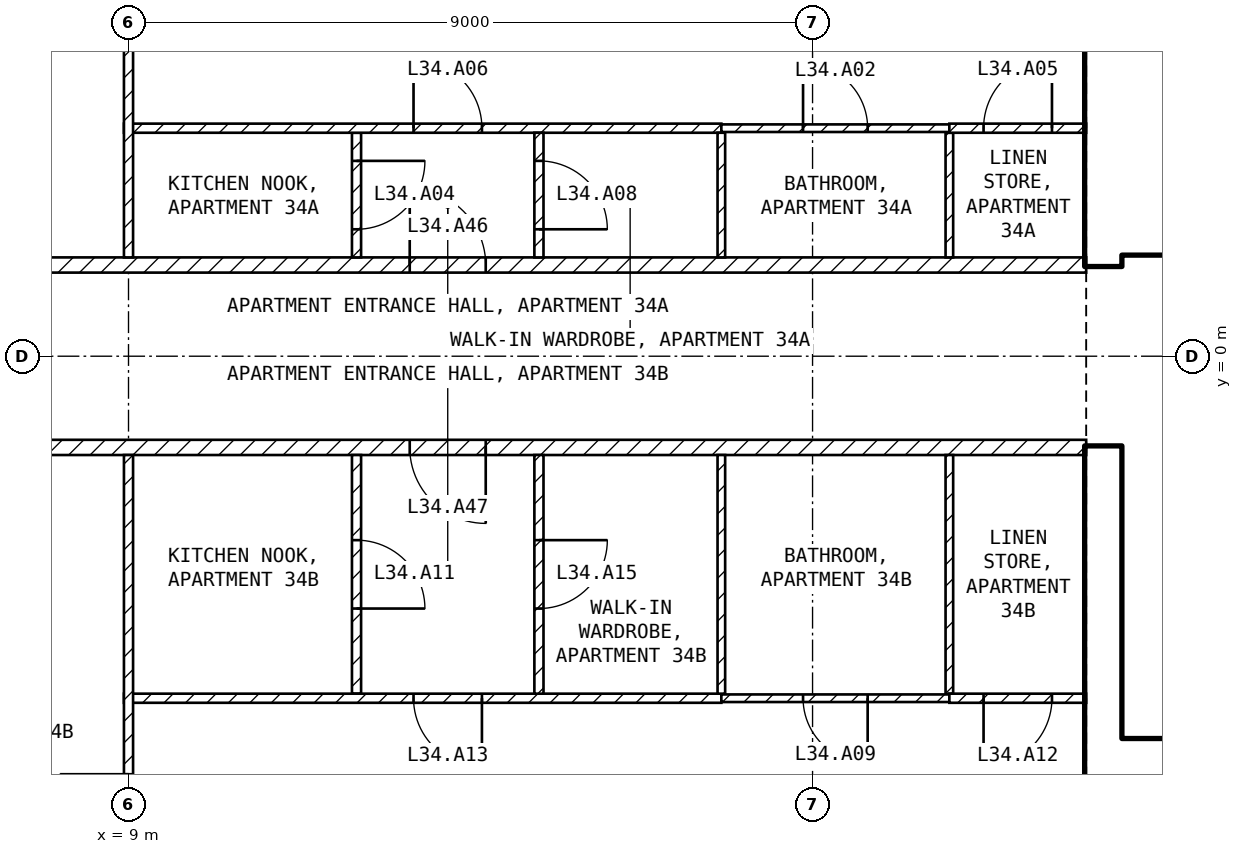
"""IFC4 building model, lengths in metres.
Left out: names, types, materials, properties, quantities, classifications, styles, units other than length and angle.
Written with IfcOpenShell. Run it as: python <this file> out.ifc"""

import sys

from ifc_helpers import new_model, si_unit, direction, frame, frame_2d, origin, place, context, subcontext, project, spatial, rectangle, extrude, element, fill, save


model = new_model("IFC4")
c1 = context("Model", 3, precision=1e-05, world=origin(), true_north=direction((0.0, 1.0)))
c2 = subcontext(c1, "Body", "Model", "MODEL_VIEW")
j1 = project(units=[si_unit("LENGTHUNIT", "METRE"), si_unit("PLANEANGLEUNIT", "RADIAN")], contexts=[c1])
p1 = place(None, origin())
s1 = spatial("IfcSite", under=j1, at=p1, CompositionType="ELEMENT")
p2 = place(p1, origin())
s2 = spatial("IfcBuilding", under=s1, at=p2, CompositionType="ELEMENT")
p3 = place(p2, frame((0.0, 0.0, 140.9)))
s3 = spatial("IfcBuildingStorey", under=s2, at=p3, CompositionType="ELEMENT", Elevation=140.9)
for number, where, z_axis, x_axis in (
    (1, (21.825, -8.1, 0.0), (0.0, 0.0, 1.0), (0.0, 1.0, 0.0)),
    (2, (21.825, 1.2, 0.0), (0.0, 0.0, 1.0), (0.0, 1.0, 0.0)),
):
    element("IfcWall", number, at=place(p3, frame(where, z_axis=z_axis, x_axis=x_axis)), inside=s3, PredefinedType="SHEAR", context=c2, shape_type="SweptSolid", body=[
        extrude(rectangle(XDim=6.9, YDim=0.45, at=frame_2d((3.45, 0.0))), origin(), (0.0, 0.0, 1.0), 3.25),
    ])
p4 = place(p3, frame((22.05, 1.45, 0.0), z_axis=(0.0, 0.0, 1.0), x_axis=(1.0, 0.0, 0.0)))
e3 = element("IfcWall", 3, at=p4, inside=s3, PredefinedType="SOLIDWALL", context=c2, shape_type="SweptSolid", body=[
    extrude(rectangle(XDim=11.0, YDim=0.2, at=frame_2d((5.5, 0.0))), origin(), (0.0, 0.0, 1.0), 3.25),
])
p5 = place(p4, frame((0.75, 0.0, 0.0)))
e4 = element("IfcOpeningElement", 4, at=p5, cuts=e3, PredefinedType="OPENING", context=c2, shape_type="SweptSolid", body=[
    extrude(rectangle(XDim=1.0, YDim=2.1, at=frame_2d((0.5, 1.05))), frame((0.0, 0.11, 0.0), z_axis=(0.0, -1.0, 0.0), x_axis=(1.0, 0.0, 0.0)), (0.0, 0.0, 1.0), 0.22),
])
p6 = place(p4, frame((3.25, 0.0, 0.0)))
e5 = element("IfcOpeningElement", 5, at=p6, cuts=e3, PredefinedType="OPENING", context=c2, shape_type="SweptSolid", body=[
    extrude(rectangle(XDim=1.0, YDim=2.1, at=frame_2d((0.5, 1.05))), frame((0.0, 0.11, 0.0), z_axis=(0.0, -1.0, 0.0), x_axis=(1.0, 0.0, 0.0)), (0.0, 0.0, 1.0), 0.22),
])
p7 = place(p4, frame((9.075, 0.0, 0.0)))
e6 = element("IfcOpeningElement", 6, at=p7, cuts=e3, PredefinedType="OPENING", context=c2, shape_type="SweptSolid", body=[
    extrude(rectangle(XDim=0.9, YDim=2.1, at=frame_2d((0.45, 1.05))), frame((0.0, 0.11, 0.0), z_axis=(0.0, -1.0, 0.0), x_axis=(1.0, 0.0, 0.0)), (0.0, 0.0, 1.0), 0.22),
])
p8 = place(p3, frame((22.05, -5.15, 0.0), z_axis=(0.0, 0.0, 1.0), x_axis=(1.0, 0.0, 0.0)))
e7 = element("IfcWall", 7, at=p8, inside=s3, PredefinedType="SOLIDWALL", context=c2, shape_type="SweptSolid", body=[
    extrude(rectangle(XDim=6.3, YDim=0.2, at=frame_2d((3.15, 0.0))), origin(), (0.0, 0.0, 1.0), 3.25),
])
p9 = place(p8, frame((0.2, 0.0, 0.0)))
e8 = element("IfcOpeningElement", 8, at=p9, cuts=e7, PredefinedType="OPENING", context=c2, shape_type="SweptSolid", body=[
    extrude(rectangle(XDim=1.0, YDim=2.1, at=frame_2d((0.5, 1.05))), frame((0.0, 0.11, 0.0), z_axis=(0.0, -1.0, 0.0), x_axis=(1.0, 0.0, 0.0)), (0.0, 0.0, 1.0), 0.22),
])
p10 = place(p3, frame((4.4, 1.2, 0.0), z_axis=(0.0, 0.0, 1.0), x_axis=(1.0, 0.0, 0.0)))
e9 = element("IfcWall", 9, at=p10, inside=s3, PredefinedType="PARTITIONING", context=c2, shape_type="SweptSolid", body=[
    extrude(rectangle(XDim=17.2, YDim=0.2, at=frame_2d((8.6, 0.0))), origin(), (0.0, 0.0, 1.0), 3.25),
])
p11 = place(p10, frame((8.3, 0.0, 0.0)))
e10 = element("IfcOpeningElement", 10, at=p11, cuts=e9, PredefinedType="OPENING", context=c2, shape_type="SweptSolid", body=[
    extrude(rectangle(XDim=1.0, YDim=2.1, at=frame_2d((0.5, 1.05))), frame((0.0, 0.11, 0.0), z_axis=(0.0, -1.0, 0.0), x_axis=(1.0, 0.0, 0.0)), (0.0, 0.0, 1.0), 0.22),
])
p12 = place(p3, frame((21.6, -1.2, 0.0), z_axis=(0.0, 0.0, 1.0), x_axis=(-1.0, 0.0, 0.0)))
e11 = element("IfcWall", 11, at=p12, inside=s3, PredefinedType="PARTITIONING", context=c2, shape_type="SweptSolid", body=[
    extrude(rectangle(XDim=17.2, YDim=0.2, at=frame_2d((8.6, 0.0))), origin(), (0.0, 0.0, 1.0), 3.25),
])
p13 = place(p12, frame((7.9, 0.0, 0.0)))
e12 = element("IfcOpeningElement", 12, at=p13, cuts=e11, PredefinedType="OPENING", context=c2, shape_type="SweptSolid", body=[
    extrude(rectangle(XDim=1.0, YDim=2.1, at=frame_2d((0.5, 1.05))), frame((0.0, 0.11, 0.0), z_axis=(0.0, -1.0, 0.0), x_axis=(1.0, 0.0, 0.0)), (0.0, 0.0, 1.0), 0.22),
])
p14 = place(p3, frame((12.0, 2.94, 0.0), z_axis=(0.0, 0.0, 1.0), x_axis=(0.0, -1.0, 0.0)))
e13 = element("IfcWall", 13, at=p14, inside=s3, PredefinedType="PARTITIONING", context=c2, shape_type="SweptSolid", body=[
    extrude(rectangle(XDim=1.64, YDim=0.12, at=frame_2d((0.82, 0.0))), origin(), (0.0, 0.0, 1.0), 3.25),
])
p15 = place(p14, frame((0.37, 0.0, 0.0)))
e14 = element("IfcOpeningElement", 14, at=p15, cuts=e13, PredefinedType="OPENING", context=c2, shape_type="SweptSolid", body=[
    extrude(rectangle(XDim=0.9, YDim=2.1, at=frame_2d((0.45, 1.05))), frame((0.0, 0.07, 0.0), z_axis=(0.0, -1.0, 0.0), x_axis=(1.0, 0.0, 0.0)), (0.0, 0.0, 1.0), 0.14),
])
p16 = place(p3, frame((8.94, 3.0, 0.0), z_axis=(0.0, 0.0, 1.0), x_axis=(1.0, 0.0, 0.0)))
e15 = element("IfcWall", 15, at=p16, inside=s3, PredefinedType="PARTITIONING", context=c2, shape_type="SweptSolid", body=[
    extrude(rectangle(XDim=7.86, YDim=0.12, at=frame_2d((3.93, 0.0))), origin(), (0.0, 0.0, 1.0), 3.25),
])
p17 = place(p16, frame((3.81, 0.0, 0.0)))
e16 = element("IfcOpeningElement", 16, at=p17, cuts=e15, PredefinedType="OPENING", context=c2, shape_type="SweptSolid", body=[
    extrude(rectangle(XDim=0.9, YDim=2.1, at=frame_2d((0.45, 1.05))), frame((0.0, 0.07, 0.0), z_axis=(0.0, -1.0, 0.0), x_axis=(1.0, 0.0, 0.0)), (0.0, 0.0, 1.0), 0.14),
])
p18 = place(p3, frame((9.0, 1.3, 0.0), z_axis=(0.0, 0.0, 1.0), x_axis=(0.0, 1.0, 0.0)))
e17 = element("IfcWall", 17, at=p18, inside=s3, PredefinedType="PARTITIONING", context=c2, shape_type="SweptSolid", body=[
    extrude(rectangle(XDim=7.62, YDim=0.12, at=frame_2d((3.81, 0.0))), origin(), (0.0, 0.0, 1.0), 3.25),
])
p19 = place(p18, frame((4.1, 0.0, 0.0)))
e18 = element("IfcOpeningElement", 18, at=p19, cuts=e17, PredefinedType="OPENING", context=c2, shape_type="SweptSolid", body=[
    extrude(rectangle(XDim=0.9, YDim=2.1, at=frame_2d((0.45, 1.05))), frame((0.0, 0.07, 0.0), z_axis=(0.0, -1.0, 0.0), x_axis=(1.0, 0.0, 0.0)), (0.0, 0.0, 1.0), 0.14),
])
p20 = place(p3, frame((14.4, 2.94, 0.0), z_axis=(0.0, 0.0, 1.0), x_axis=(0.0, -1.0, 0.0)))
e19 = element("IfcWall", 19, at=p20, inside=s3, PredefinedType="PARTITIONING", context=c2, shape_type="SweptSolid", body=[
    extrude(rectangle(XDim=1.64, YDim=0.12, at=frame_2d((0.82, 0.0))), origin(), (0.0, 0.0, 1.0), 3.25),
])
p21 = place(p20, frame((0.37, 0.0, 0.0)))
e20 = element("IfcOpeningElement", 20, at=p21, cuts=e19, PredefinedType="OPENING", context=c2, shape_type="SweptSolid", body=[
    extrude(rectangle(XDim=0.9, YDim=2.1, at=frame_2d((0.45, 1.05))), frame((0.0, 0.07, 0.0), z_axis=(0.0, -1.0, 0.0), x_axis=(1.0, 0.0, 0.0)), (0.0, 0.0, 1.0), 0.14),
])
for number, where, z_axis, x_axis in (
    (21, (16.8, 2.94, 0.0), (0.0, 0.0, 1.0), (0.0, -1.0, 0.0)),
    (22, (19.8, 2.94, 0.0), (0.0, 0.0, 1.0), (0.0, -1.0, 0.0)),
):
    element("IfcWall", number, at=place(p3, frame(where, z_axis=z_axis, x_axis=x_axis)), inside=s3, PredefinedType="PARTITIONING", context=c2, shape_type="SweptSolid", body=[
        extrude(rectangle(XDim=1.64, YDim=0.1, at=frame_2d((0.82, 0.0))), origin(), (0.0, 0.0, 1.0), 3.25),
    ])
p22 = place(p3, frame((16.8, 3.0, 0.0), z_axis=(0.0, 0.0, 1.0), x_axis=(1.0, 0.0, 0.0)))
e23 = element("IfcWall", 23, at=p22, inside=s3, PredefinedType="PARTITIONING", context=c2, shape_type="SweptSolid", body=[
    extrude(rectangle(XDim=3.0, YDim=0.1, at=frame_2d((1.5, 0.0))), origin(), (0.0, 0.0, 1.0), 3.25),
])
p23 = place(p22, frame((1.075, 0.0, 0.0)))
e24 = element("IfcOpeningElement", 24, at=p23, cuts=e23, PredefinedType="OPENING", context=c2, shape_type="SweptSolid", body=[
    extrude(rectangle(XDim=0.85, YDim=2.1, at=frame_2d((0.425, 1.05))), frame((0.0, 0.06, 0.0), z_axis=(0.0, -1.0, 0.0), x_axis=(1.0, 0.0, 0.0)), (0.0, 0.0, 1.0), 0.12),
])
p24 = place(p3, frame((19.8, 3.0, 0.0), z_axis=(0.0, 0.0, 1.0), x_axis=(1.0, 0.0, 0.0)))
e25 = element("IfcWall", 25, at=p24, inside=s3, PredefinedType="PARTITIONING", context=c2, shape_type="SweptSolid", body=[
    extrude(rectangle(XDim=1.8, YDim=0.12, at=frame_2d((0.9, 0.0))), origin(), (0.0, 0.0, 1.0), 3.25),
])
p25 = place(p24, frame((0.45, 0.0, 0.0)))
e26 = element("IfcOpeningElement", 26, at=p25, cuts=e25, PredefinedType="OPENING", context=c2, shape_type="SweptSolid", body=[
    extrude(rectangle(XDim=0.9, YDim=2.1, at=frame_2d((0.45, 1.05))), frame((0.0, 0.07, 0.0), z_axis=(0.0, -1.0, 0.0), x_axis=(1.0, 0.0, 0.0)), (0.0, 0.0, 1.0), 0.14),
])
p26 = place(p3, frame((12.0, -1.3, 0.0), z_axis=(0.0, 0.0, 1.0), x_axis=(0.0, -1.0, 0.0)))
e27 = element("IfcWall", 27, at=p26, inside=s3, PredefinedType="PARTITIONING", context=c2, shape_type="SweptSolid", body=[
    extrude(rectangle(XDim=3.14, YDim=0.12, at=frame_2d((1.57, 0.0))), origin(), (0.0, 0.0, 1.0), 3.25),
])
p27 = place(p26, frame((1.12, 0.0, 0.0)))
e28 = element("IfcOpeningElement", 28, at=p27, cuts=e27, PredefinedType="OPENING", context=c2, shape_type="SweptSolid", body=[
    extrude(rectangle(XDim=0.9, YDim=2.1, at=frame_2d((0.45, 1.05))), frame((0.0, 0.07, 0.0), z_axis=(0.0, -1.0, 0.0), x_axis=(1.0, 0.0, 0.0)), (0.0, 0.0, 1.0), 0.14),
])
p28 = place(p3, frame((16.8, -4.5, 0.0), z_axis=(0.0, 0.0, 1.0), x_axis=(-1.0, 0.0, 0.0)))
e29 = element("IfcWall", 29, at=p28, inside=s3, PredefinedType="PARTITIONING", context=c2, shape_type="SweptSolid", body=[
    extrude(rectangle(XDim=7.86, YDim=0.12, at=frame_2d((3.93, 0.0))), origin(), (0.0, 0.0, 1.0), 3.25),
])
p29 = place(p28, frame((3.15, 0.0, 0.0)))
e30 = element("IfcOpeningElement", 30, at=p29, cuts=e29, PredefinedType="OPENING", context=c2, shape_type="SweptSolid", body=[
    extrude(rectangle(XDim=0.9, YDim=2.1, at=frame_2d((0.45, 1.05))), frame((0.0, 0.07, 0.0), z_axis=(0.0, -1.0, 0.0), x_axis=(1.0, 0.0, 0.0)), (0.0, 0.0, 1.0), 0.14),
])
p30 = place(p3, frame((9.0, -8.92, 0.0), z_axis=(0.0, 0.0, 1.0), x_axis=(0.0, 1.0, 0.0)))
e31 = element("IfcWall", 31, at=p30, inside=s3, PredefinedType="PARTITIONING", context=c2, shape_type="SweptSolid", body=[
    extrude(rectangle(XDim=7.62, YDim=0.12, at=frame_2d((3.81, 0.0))), origin(), (0.0, 0.0, 1.0), 3.25),
])
p31 = place(p30, frame((2.52, 0.0, 0.0)))
e32 = element("IfcOpeningElement", 32, at=p31, cuts=e31, PredefinedType="OPENING", context=c2, shape_type="SweptSolid", body=[
    extrude(rectangle(XDim=0.9, YDim=2.1, at=frame_2d((0.45, 1.05))), frame((0.0, 0.07, 0.0), z_axis=(0.0, -1.0, 0.0), x_axis=(1.0, 0.0, 0.0)), (0.0, 0.0, 1.0), 0.14),
])
p32 = place(p3, frame((14.4, -1.3, 0.0), z_axis=(0.0, 0.0, 1.0), x_axis=(0.0, -1.0, 0.0)))
e33 = element("IfcWall", 33, at=p32, inside=s3, PredefinedType="PARTITIONING", context=c2, shape_type="SweptSolid", body=[
    extrude(rectangle(XDim=3.14, YDim=0.12, at=frame_2d((1.57, 0.0))), origin(), (0.0, 0.0, 1.0), 3.25),
])
p33 = place(p32, frame((1.12, 0.0, 0.0)))
e34 = element("IfcOpeningElement", 34, at=p33, cuts=e33, PredefinedType="OPENING", context=c2, shape_type="SweptSolid", body=[
    extrude(rectangle(XDim=0.9, YDim=2.1, at=frame_2d((0.45, 1.05))), frame((0.0, 0.07, 0.0), z_axis=(0.0, -1.0, 0.0), x_axis=(1.0, 0.0, 0.0)), (0.0, 0.0, 1.0), 0.14),
])
for number, where, z_axis, x_axis in (
    (35, (16.8, -1.3, 0.0), (0.0, 0.0, 1.0), (0.0, -1.0, 0.0)),
    (36, (19.8, -1.3, 0.0), (0.0, 0.0, 1.0), (0.0, -1.0, 0.0)),
):
    element("IfcWall", number, at=place(p3, frame(where, z_axis=z_axis, x_axis=x_axis)), inside=s3, PredefinedType="PARTITIONING", context=c2, shape_type="SweptSolid", body=[
        extrude(rectangle(XDim=3.14, YDim=0.1, at=frame_2d((1.57, 0.0))), origin(), (0.0, 0.0, 1.0), 3.25),
    ])
p34 = place(p3, frame((19.8, -4.5, 0.0), z_axis=(0.0, 0.0, 1.0), x_axis=(-1.0, 0.0, 0.0)))
e37 = element("IfcWall", 37, at=p34, inside=s3, PredefinedType="PARTITIONING", context=c2, shape_type="SweptSolid", body=[
    extrude(rectangle(XDim=3.0, YDim=0.1, at=frame_2d((1.5, 0.0))), origin(), (0.0, 0.0, 1.0), 3.25),
])
p35 = place(p34, frame((1.075, 0.0, 0.0)))
e38 = element("IfcOpeningElement", 38, at=p35, cuts=e37, PredefinedType="OPENING", context=c2, shape_type="SweptSolid", body=[
    extrude(rectangle(XDim=0.85, YDim=2.1, at=frame_2d((0.425, 1.05))), frame((0.0, 0.06, 0.0), z_axis=(0.0, -1.0, 0.0), x_axis=(1.0, 0.0, 0.0)), (0.0, 0.0, 1.0), 0.12),
])
p36 = place(p3, frame((21.6, -4.5, 0.0), z_axis=(0.0, 0.0, 1.0), x_axis=(-1.0, 0.0, 0.0)))
e39 = element("IfcWall", 39, at=p36, inside=s3, PredefinedType="PARTITIONING", context=c2, shape_type="SweptSolid", body=[
    extrude(rectangle(XDim=1.8, YDim=0.12, at=frame_2d((0.9, 0.0))), origin(), (0.0, 0.0, 1.0), 3.25),
])
p37 = place(p36, frame((0.45, 0.0, 0.0)))
e40 = element("IfcOpeningElement", 40, at=p37, cuts=e39, PredefinedType="OPENING", context=c2, shape_type="SweptSolid", body=[
    extrude(rectangle(XDim=0.9, YDim=2.1, at=frame_2d((0.45, 1.05))), frame((0.0, 0.07, 0.0), z_axis=(0.0, -1.0, 0.0), x_axis=(1.0, 0.0, 0.0)), (0.0, 0.0, 1.0), 0.14),
])
p38 = place(p9, origin())
e41 = element("IfcDoor", 41, at=p38, inside=s3, OperationType="SINGLE_SWING_LEFT", PredefinedType="DOOR", context=c2, shape_type="SweptSolid", body=[
    extrude(rectangle(XDim=1.0, YDim=2.1, at=frame_2d((0.5, 1.05))), frame((0.0, 0.025, 0.0), z_axis=(0.0, -1.0, 0.0), x_axis=(1.0, 0.0, 0.0)), (0.0, 0.0, 1.0), 0.05),
])
fill(e8, e41)
p39 = place(p23, origin())
e42 = element("IfcDoor", 42, at=p39, inside=s3, OperationType="SINGLE_SWING_LEFT", PredefinedType="DOOR", context=c2, shape_type="SweptSolid", body=[
    extrude(rectangle(XDim=0.85, YDim=2.1, at=frame_2d((0.425, 1.05))), frame((0.0, 0.025, 0.0), z_axis=(0.0, -1.0, 0.0), x_axis=(1.0, 0.0, 0.0)), (0.0, 0.0, 1.0), 0.05),
])
fill(e24, e42)
p40 = place(p15, origin())
e43 = element("IfcDoor", 43, at=p40, inside=s3, OperationType="SINGLE_SWING_LEFT", PredefinedType="DOOR", context=c2, shape_type="SweptSolid", body=[
    extrude(rectangle(XDim=0.9, YDim=2.1, at=frame_2d((0.45, 1.05))), frame((0.0, 0.025, 0.0), z_axis=(0.0, -1.0, 0.0), x_axis=(1.0, 0.0, 0.0)), (0.0, 0.0, 1.0), 0.05),
])
fill(e14, e43)
p41 = place(p25, origin())
e44 = element("IfcDoor", 44, at=p41, inside=s3, OperationType="SINGLE_SWING_RIGHT", PredefinedType="DOOR", context=c2, shape_type="SweptSolid", body=[
    extrude(rectangle(XDim=0.9, YDim=2.1, at=frame_2d((0.45, 1.05))), frame((0.0, 0.025, 0.0), z_axis=(0.0, -1.0, 0.0), x_axis=(1.0, 0.0, 0.0)), (0.0, 0.0, 1.0), 0.05),
])
fill(e26, e44)
p42 = place(p17, origin())
e45 = element("IfcDoor", 45, at=p42, inside=s3, OperationType="SINGLE_SWING_LEFT", PredefinedType="DOOR", context=c2, shape_type="SweptSolid", body=[
    extrude(rectangle(XDim=0.9, YDim=2.1, at=frame_2d((0.45, 1.05))), frame((0.0, 0.025, 0.0), z_axis=(0.0, -1.0, 0.0), x_axis=(1.0, 0.0, 0.0)), (0.0, 0.0, 1.0), 0.05),
])
fill(e16, e45)
p43 = place(p21, origin())
e46 = element("IfcDoor", 46, at=p43, inside=s3, OperationType="SINGLE_SWING_RIGHT", PredefinedType="DOOR", context=c2, shape_type="SweptSolid", body=[
    extrude(rectangle(XDim=0.9, YDim=2.1, at=frame_2d((0.45, 1.05))), frame((0.0, 0.025, 0.0), z_axis=(0.0, -1.0, 0.0), x_axis=(1.0, 0.0, 0.0)), (0.0, 0.0, 1.0), 0.05),
])
fill(e20, e46)
p44 = place(p35, origin())
e47 = element("IfcDoor", 47, at=p44, inside=s3, OperationType="SINGLE_SWING_LEFT", PredefinedType="DOOR", context=c2, shape_type="SweptSolid", body=[
    extrude(rectangle(XDim=0.85, YDim=2.1, at=frame_2d((0.425, 1.05))), frame((0.0, 0.025, 0.0), z_axis=(0.0, -1.0, 0.0), x_axis=(1.0, 0.0, 0.0)), (0.0, 0.0, 1.0), 0.05),
])
fill(e38, e47)
p45 = place(p27, origin())
e48 = element("IfcDoor", 48, at=p45, inside=s3, OperationType="SINGLE_SWING_RIGHT", PredefinedType="DOOR", context=c2, shape_type="SweptSolid", body=[
    extrude(rectangle(XDim=0.9, YDim=2.1, at=frame_2d((0.45, 1.05))), frame((0.0, 0.025, 0.0), z_axis=(0.0, -1.0, 0.0), x_axis=(1.0, 0.0, 0.0)), (0.0, 0.0, 1.0), 0.05),
])
fill(e28, e48)
p46 = place(p37, origin())
e49 = element("IfcDoor", 49, at=p46, inside=s3, OperationType="SINGLE_SWING_RIGHT", PredefinedType="DOOR", context=c2, shape_type="SweptSolid", body=[
    extrude(rectangle(XDim=0.9, YDim=2.1, at=frame_2d((0.45, 1.05))), frame((0.0, 0.025, 0.0), z_axis=(0.0, -1.0, 0.0), x_axis=(1.0, 0.0, 0.0)), (0.0, 0.0, 1.0), 0.05),
])
fill(e40, e49)
p47 = place(p29, origin())
e50 = element("IfcDoor", 50, at=p47, inside=s3, OperationType="SINGLE_SWING_LEFT", PredefinedType="DOOR", context=c2, shape_type="SweptSolid", body=[
    extrude(rectangle(XDim=0.9, YDim=2.1, at=frame_2d((0.45, 1.05))), frame((0.0, 0.025, 0.0), z_axis=(0.0, -1.0, 0.0), x_axis=(1.0, 0.0, 0.0)), (0.0, 0.0, 1.0), 0.05),
])
fill(e30, e50)
p48 = place(p33, origin())
e51 = element("IfcDoor", 51, at=p48, inside=s3, OperationType="SINGLE_SWING_LEFT", PredefinedType="DOOR", context=c2, shape_type="SweptSolid", body=[
    extrude(rectangle(XDim=0.9, YDim=2.1, at=frame_2d((0.45, 1.05))), frame((0.0, 0.025, 0.0), z_axis=(0.0, -1.0, 0.0), x_axis=(1.0, 0.0, 0.0)), (0.0, 0.0, 1.0), 0.05),
])
fill(e34, e51)
p49 = place(p11, origin())
e52 = element("IfcDoor", 52, at=p49, inside=s3, OperationType="SINGLE_SWING_LEFT", PredefinedType="DOOR", context=c2, shape_type="SweptSolid", body=[
    extrude(rectangle(XDim=1.0, YDim=2.1, at=frame_2d((0.5, 1.05))), frame((0.0, 0.025, 0.0), z_axis=(0.0, -1.0, 0.0), x_axis=(1.0, 0.0, 0.0)), (0.0, 0.0, 1.0), 0.05),
])
fill(e10, e52)
p50 = place(p13, origin())
e53 = element("IfcDoor", 53, at=p50, inside=s3, OperationType="SINGLE_SWING_LEFT", PredefinedType="DOOR", context=c2, shape_type="SweptSolid", body=[
    extrude(rectangle(XDim=1.0, YDim=2.1, at=frame_2d((0.5, 1.05))), frame((0.0, 0.025, 0.0), z_axis=(0.0, -1.0, 0.0), x_axis=(1.0, 0.0, 0.0)), (0.0, 0.0, 1.0), 0.05),
])
fill(e12, e53)
save(model, sys.argv[1])
